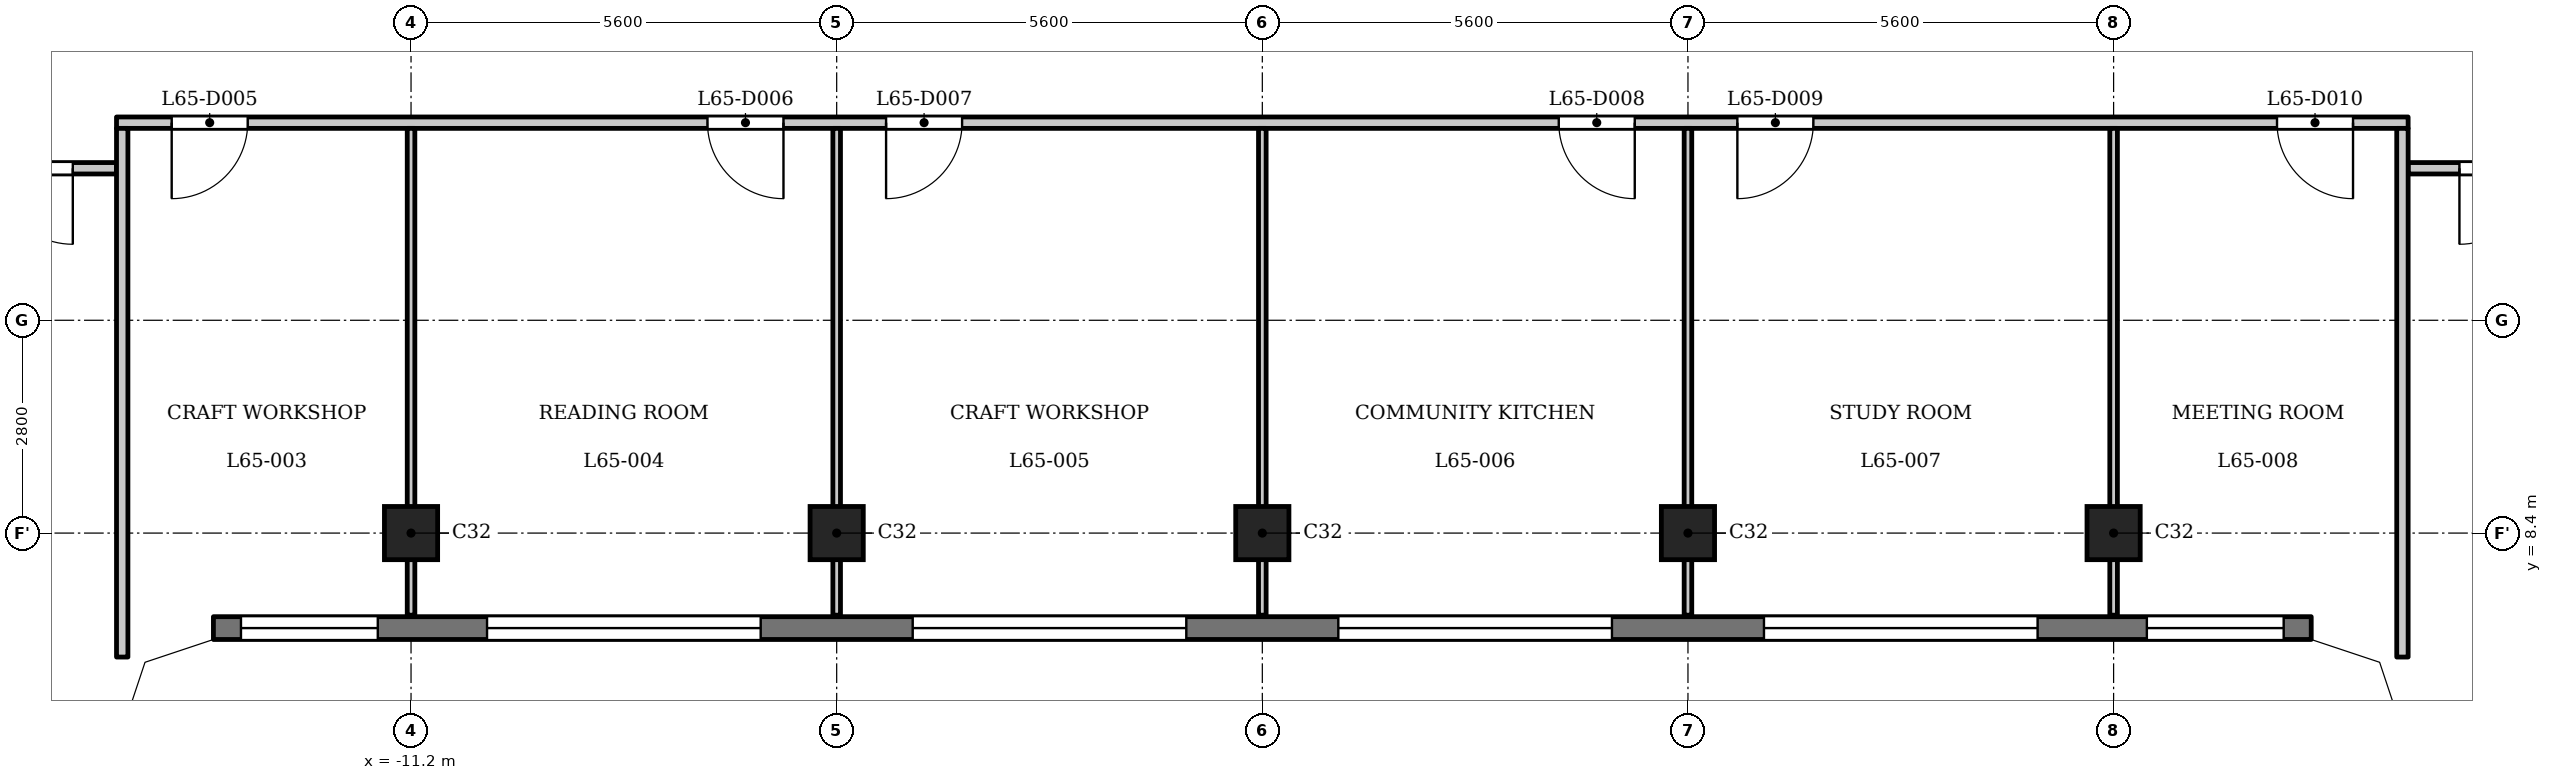
"""IFC4 building model, lengths in metres.
Left out: names, types, materials, properties, quantities, classifications, styles, units other than length and angle.
Written with IfcOpenShell. Run it as: python <this file> out.ifc"""

import sys

from ifc_helpers import new_model, si_unit, direction, frame, frame_2d, origin, origin_2d, place, context, subcontext, project, spatial, polyline, rectangle, outline, extrude, element, fill, save


model = new_model("IFC4")
c1 = context("Model", 3, precision=1e-05, world=origin(), true_north=direction((0.0, 1.0)))
c2 = subcontext(c1, "Body", "Model", "MODEL_VIEW")
j1 = project(units=[si_unit("LENGTHUNIT", "METRE"), si_unit("PLANEANGLEUNIT", "RADIAN")], contexts=[c1])
p1 = place(None, origin())
s1 = spatial("IfcSite", under=j1, at=p1, CompositionType="ELEMENT")
p2 = place(p1, origin())
s2 = spatial("IfcBuilding", under=s1, at=p2, CompositionType="ELEMENT")
p3 = place(p2, frame((0.0, 0.0, 252.2)))
s3 = spatial("IfcBuildingStorey", under=s2, at=p3, CompositionType="ELEMENT", Elevation=252.2)
for number, where, z_axis, x_axis in (
    (1, (-11.2, 8.4, 0.0), (0.0, 0.0, 1.0), (1.0, 0.0, 0.0)),
    (2, (-5.6, 8.4, 0.0), (0.0, 0.0, 1.0), (1.0, 0.0, 0.0)),
    (3, (0.0, 8.4, 0.0), (0.0, 0.0, 1.0), (1.0, 0.0, 0.0)),
    (4, (5.6, 8.4, 0.0), (0.0, 0.0, 1.0), (1.0, 0.0, 0.0)),
    (5, (11.2, 8.4, 0.0), (0.0, 0.0, 1.0), (1.0, 0.0, 0.0)),
):
    element("IfcColumn", number, at=place(p3, frame(where, z_axis=z_axis, x_axis=x_axis)), inside=s3, PredefinedType="COLUMN", context=c2, shape_type="SweptSolid", body=[
        extrude(rectangle(XDim=0.7, YDim=0.7, at=origin_2d()), origin(), (0.0, 0.0, 1.0), 3.5),
    ])
p4 = place(p3, frame((-13.8, 7.15, 0.0), z_axis=(0.0, 0.0, 1.0), x_axis=(1.0, 0.0, 0.0)))
e6 = element("IfcWall", 6, at=p4, inside=s3, PredefinedType="SOLIDWALL", context=c2, shape_type="SweptSolid", body=[
    extrude(rectangle(XDim=27.6, YDim=0.3, at=frame_2d((13.8, 0.0))), origin(), (0.0, 0.0, 1.0), 3.2),
])
p5 = place(p4, frame((0.363, 0.0, 0.9)))
e7 = element("IfcOpeningElement", 7, at=p5, cuts=e6, PredefinedType="OPENING", context=c2, shape_type="SweptSolid", body=[
    extrude(rectangle(XDim=1.8, YDim=1.25, at=frame_2d((0.9, 0.625))), frame((0.0, 0.16, 0.0), z_axis=(0.0, -1.0, 0.0), x_axis=(1.0, 0.0, 0.0)), (0.0, 0.0, 1.0), 0.32),
])
p6 = place(p4, frame((3.6, 0.0, 1.2)))
e8 = element("IfcOpeningElement", 8, at=p6, cuts=e6, PredefinedType="OPENING", context=c2, shape_type="SweptSolid", body=[
    extrude(rectangle(XDim=3.6, YDim=0.95, at=frame_2d((1.8, 0.475))), frame((0.0, 0.16, 0.0), z_axis=(0.0, -1.0, 0.0), x_axis=(1.0, 0.0, 0.0)), (0.0, 0.0, 1.0), 0.32),
])
p7 = place(p4, frame((9.2, 0.0, 1.2)))
e9 = element("IfcOpeningElement", 9, at=p7, cuts=e6, PredefinedType="OPENING", context=c2, shape_type="SweptSolid", body=[
    extrude(rectangle(XDim=3.6, YDim=0.95, at=frame_2d((1.8, 0.475))), frame((0.0, 0.16, 0.0), z_axis=(0.0, -1.0, 0.0), x_axis=(1.0, 0.0, 0.0)), (0.0, 0.0, 1.0), 0.32),
])
p8 = place(p4, frame((14.8, 0.0, 1.2)))
e10 = element("IfcOpeningElement", 10, at=p8, cuts=e6, PredefinedType="OPENING", context=c2, shape_type="SweptSolid", body=[
    extrude(rectangle(XDim=3.6, YDim=0.95, at=frame_2d((1.8, 0.475))), frame((0.0, 0.16, 0.0), z_axis=(0.0, -1.0, 0.0), x_axis=(1.0, 0.0, 0.0)), (0.0, 0.0, 1.0), 0.32),
])
p9 = place(p4, frame((20.4, 0.0, 1.2)))
e11 = element("IfcOpeningElement", 11, at=p9, cuts=e6, PredefinedType="OPENING", context=c2, shape_type="SweptSolid", body=[
    extrude(rectangle(XDim=3.6, YDim=0.95, at=frame_2d((1.8, 0.475))), frame((0.0, 0.16, 0.0), z_axis=(0.0, -1.0, 0.0), x_axis=(1.0, 0.0, 0.0)), (0.0, 0.0, 1.0), 0.32),
])
p10 = place(p4, frame((25.438, 0.0, 0.9)))
e12 = element("IfcOpeningElement", 12, at=p10, cuts=e6, PredefinedType="OPENING", context=c2, shape_type="SweptSolid", body=[
    extrude(rectangle(XDim=1.8, YDim=1.25, at=frame_2d((0.9, 0.625))), frame((0.0, 0.16, 0.0), z_axis=(0.0, -1.0, 0.0), x_axis=(1.0, 0.0, 0.0)), (0.0, 0.0, 1.0), 0.32),
])
p11 = place(p3, frame((-17.4, 13.2, 0.0), z_axis=(0.0, 0.0, 1.0), x_axis=(1.0, 0.0, 0.0)))
e13 = element("IfcWall", 13, at=p11, inside=s3, PredefinedType="PARTITIONING", context=c2, shape_type="SweptSolid", body=[
    extrude(rectangle(XDim=2.325, YDim=0.15, at=frame_2d((1.163, 0.0))), origin(), (0.0, 0.0, 1.0), 3.2),
])
p12 = place(p11, frame((0.75, 0.0, 0.0)))
e14 = element("IfcOpeningElement", 14, at=p12, cuts=e13, PredefinedType="OPENING", context=c2, shape_type="SweptSolid", body=[
    extrude(rectangle(XDim=1.0, YDim=2.1, at=frame_2d((0.5, 1.05))), frame((0.0, 0.085, 0.0), z_axis=(0.0, -1.0, 0.0), x_axis=(1.0, 0.0, 0.0)), (0.0, 0.0, 1.0), 0.17),
])
p13 = place(p3, frame((15.075, 13.2, 0.0), z_axis=(0.0, 0.0, 1.0), x_axis=(1.0, 0.0, 0.0)))
e15 = element("IfcWall", 15, at=p13, inside=s3, PredefinedType="PARTITIONING", context=c2, shape_type="SweptSolid", body=[
    extrude(rectangle(XDim=2.325, YDim=0.15, at=frame_2d((1.163, 0.0))), origin(), (0.0, 0.0, 1.0), 3.2),
])
p14 = place(p13, frame((0.675, 0.0, 0.0)))
e16 = element("IfcOpeningElement", 16, at=p14, cuts=e15, PredefinedType="OPENING", context=c2, shape_type="SweptSolid", body=[
    extrude(rectangle(XDim=1.0, YDim=2.1, at=frame_2d((0.5, 1.05))), frame((0.0, 0.085, 0.0), z_axis=(0.0, -1.0, 0.0), x_axis=(1.0, 0.0, 0.0)), (0.0, 0.0, 1.0), 0.17),
])
p15 = place(p3, frame((-15.075, 13.8, 0.0), z_axis=(0.0, 0.0, 1.0), x_axis=(1.0, 0.0, 0.0)))
e17 = element("IfcWall", 17, at=p15, inside=s3, PredefinedType="PARTITIONING", context=c2, shape_type="SweptSolid", body=[
    extrude(rectangle(XDim=30.15, YDim=0.15, at=frame_2d((15.075, 0.0))), origin(), (0.0, 0.0, 1.0), 3.2),
])
p16 = place(p15, frame((0.726, 0.0, 0.0)))
e18 = element("IfcOpeningElement", 18, at=p16, cuts=e17, PredefinedType="OPENING", context=c2, shape_type="SweptSolid", body=[
    extrude(rectangle(XDim=1.0, YDim=2.1, at=frame_2d((0.5, 1.05))), frame((0.0, 0.085, 0.0), z_axis=(0.0, -1.0, 0.0), x_axis=(1.0, 0.0, 0.0)), (0.0, 0.0, 1.0), 0.17),
])
p17 = place(p15, frame((7.775, 0.0, 0.0)))
e19 = element("IfcOpeningElement", 19, at=p17, cuts=e17, PredefinedType="OPENING", context=c2, shape_type="SweptSolid", body=[
    extrude(rectangle(XDim=1.0, YDim=2.1, at=frame_2d((0.5, 1.05))), frame((0.0, 0.085, 0.0), z_axis=(0.0, -1.0, 0.0), x_axis=(1.0, 0.0, 0.0)), (0.0, 0.0, 1.0), 0.17),
])
p18 = place(p15, frame((10.125, 0.0, 0.0)))
e20 = element("IfcOpeningElement", 20, at=p18, cuts=e17, PredefinedType="OPENING", context=c2, shape_type="SweptSolid", body=[
    extrude(rectangle(XDim=1.0, YDim=2.1, at=frame_2d((0.5, 1.05))), frame((0.0, 0.085, 0.0), z_axis=(0.0, -1.0, 0.0), x_axis=(1.0, 0.0, 0.0)), (0.0, 0.0, 1.0), 0.17),
])
p19 = place(p15, frame((18.975, 0.0, 0.0)))
e21 = element("IfcOpeningElement", 21, at=p19, cuts=e17, PredefinedType="OPENING", context=c2, shape_type="SweptSolid", body=[
    extrude(rectangle(XDim=1.0, YDim=2.1, at=frame_2d((0.5, 1.05))), frame((0.0, 0.085, 0.0), z_axis=(0.0, -1.0, 0.0), x_axis=(1.0, 0.0, 0.0)), (0.0, 0.0, 1.0), 0.17),
])
p20 = place(p15, frame((21.325, 0.0, 0.0)))
e22 = element("IfcOpeningElement", 22, at=p20, cuts=e17, PredefinedType="OPENING", context=c2, shape_type="SweptSolid", body=[
    extrude(rectangle(XDim=1.0, YDim=2.1, at=frame_2d((0.5, 1.05))), frame((0.0, 0.085, 0.0), z_axis=(0.0, -1.0, 0.0), x_axis=(1.0, 0.0, 0.0)), (0.0, 0.0, 1.0), 0.17),
])
p21 = place(p15, frame((28.425, 0.0, 0.0)))
e23 = element("IfcOpeningElement", 23, at=p21, cuts=e17, PredefinedType="OPENING", context=c2, shape_type="SweptSolid", body=[
    extrude(rectangle(XDim=1.0, YDim=2.1, at=frame_2d((0.5, 1.05))), frame((0.0, 0.085, 0.0), z_axis=(0.0, -1.0, 0.0), x_axis=(1.0, 0.0, 0.0)), (0.0, 0.0, 1.0), 0.17),
])
p22 = place(p3, frame((-15.0, 6.769, 0.0), z_axis=(0.0, 0.0, 1.0), x_axis=(0.0, 1.0, 0.0)))
e24 = element("IfcWall", 24, at=p22, inside=s3, PredefinedType="PARTITIONING", context=c2, shape_type="SweptSolid", body=[
    extrude(rectangle(XDim=6.956, YDim=0.15, at=frame_2d((3.478, 0.0))), origin(), (0.0, 0.0, 1.0), 3.2),
])
for number, where, z_axis, x_axis in (
    (25, (-11.2, 7.32, 0.0), (0.0, 0.0, 1.0), (0.0, 1.0, 0.0)),
    (26, (-5.6, 7.32, 0.0), (0.0, 0.0, 1.0), (0.0, 1.0, 0.0)),
    (27, (0.0, 7.32, 0.0), (0.0, 0.0, 1.0), (0.0, 1.0, 0.0)),
    (28, (5.6, 7.32, 0.0), (0.0, 0.0, 1.0), (0.0, 1.0, 0.0)),
    (29, (11.2, 7.32, 0.0), (0.0, 0.0, 1.0), (0.0, 1.0, 0.0)),
):
    element("IfcWall", number, at=place(p3, frame(where, z_axis=z_axis, x_axis=x_axis)), inside=s3, PredefinedType="PARTITIONING", context=c2, shape_type="SweptSolid", body=[
        extrude(rectangle(XDim=6.405, YDim=0.1, at=frame_2d((3.203, 0.0))), origin(), (0.0, 0.0, 1.0), 3.2),
    ])
p23 = place(p3, frame((15.0, 6.769, 0.0), z_axis=(0.0, 0.0, 1.0), x_axis=(0.0, 1.0, 0.0)))
e30 = element("IfcWall", 30, at=p23, inside=s3, PredefinedType="PARTITIONING", context=c2, shape_type="SweptSolid", body=[
    extrude(rectangle(XDim=6.956, YDim=0.15, at=frame_2d((3.478, 0.0))), origin(), (0.0, 0.0, 1.0), 3.2),
])
p24 = place(p3, origin())
e31 = element("IfcWall", 31, at=p24, inside=s3, PredefinedType="SOLIDWALL", context=c2, shape_type="SweptSolid", body=[
    extrude(outline(polyline([(-13.849, 7.3), (-14.937, 6.937), (-15.3, 5.849), (-15.3, 5.8), (-15.0, 5.8), (-14.7, 6.7), (-13.8, 7.0), (-13.8, 7.3), (-13.849, 7.3)])), origin(), (0.0, 0.0, 1.0), 3.2),
])
e32 = element("IfcWall", 32, at=p24, inside=s3, PredefinedType="SOLIDWALL", context=c2, shape_type="SweptSolid", body=[
    extrude(outline(polyline([(14.937, 6.937), (13.849, 7.3), (13.8, 7.3), (13.8, 7.0), (14.7, 6.7), (15.0, 5.8), (15.3, 5.8), (15.3, 5.849), (14.937, 6.937)])), origin(), (0.0, 0.0, 1.0), 3.2),
])
p25 = place(p12, origin())
e33 = element("IfcDoor", 33, at=p25, inside=s3, OperationType="SINGLE_SWING_RIGHT", PredefinedType="DOOR", context=c2, shape_type="SweptSolid", body=[
    extrude(rectangle(XDim=1.0, YDim=2.1, at=frame_2d((0.5, 1.05))), frame((0.0, 0.025, 0.0), z_axis=(0.0, -1.0, 0.0), x_axis=(1.0, 0.0, 0.0)), (0.0, 0.0, 1.0), 0.05),
])
fill(e14, e33)
p26 = place(p14, origin())
e34 = element("IfcDoor", 34, at=p26, inside=s3, OperationType="SINGLE_SWING_LEFT", PredefinedType="DOOR", context=c2, shape_type="SweptSolid", body=[
    extrude(rectangle(XDim=1.0, YDim=2.1, at=frame_2d((0.5, 1.05))), frame((0.0, 0.025, 0.0), z_axis=(0.0, -1.0, 0.0), x_axis=(1.0, 0.0, 0.0)), (0.0, 0.0, 1.0), 0.05),
])
fill(e16, e34)
p27 = place(p16, origin())
e35 = element("IfcDoor", 35, at=p27, inside=s3, OperationType="SINGLE_SWING_LEFT", PredefinedType="DOOR", context=c2, shape_type="SweptSolid", body=[
    extrude(rectangle(XDim=1.0, YDim=2.1, at=frame_2d((0.5, 1.05))), frame((0.0, 0.025, 0.0), z_axis=(0.0, -1.0, 0.0), x_axis=(1.0, 0.0, 0.0)), (0.0, 0.0, 1.0), 0.05),
])
fill(e18, e35)
p28 = place(p17, origin())
e36 = element("IfcDoor", 36, at=p28, inside=s3, OperationType="SINGLE_SWING_RIGHT", PredefinedType="DOOR", context=c2, shape_type="SweptSolid", body=[
    extrude(rectangle(XDim=1.0, YDim=2.1, at=frame_2d((0.5, 1.05))), frame((0.0, 0.025, 0.0), z_axis=(0.0, -1.0, 0.0), x_axis=(1.0, 0.0, 0.0)), (0.0, 0.0, 1.0), 0.05),
])
fill(e19, e36)
p29 = place(p18, origin())
e37 = element("IfcDoor", 37, at=p29, inside=s3, OperationType="SINGLE_SWING_LEFT", PredefinedType="DOOR", context=c2, shape_type="SweptSolid", body=[
    extrude(rectangle(XDim=1.0, YDim=2.1, at=frame_2d((0.5, 1.05))), frame((0.0, 0.025, 0.0), z_axis=(0.0, -1.0, 0.0), x_axis=(1.0, 0.0, 0.0)), (0.0, 0.0, 1.0), 0.05),
])
fill(e20, e37)
p30 = place(p19, origin())
e38 = element("IfcDoor", 38, at=p30, inside=s3, OperationType="SINGLE_SWING_RIGHT", PredefinedType="DOOR", context=c2, shape_type="SweptSolid", body=[
    extrude(rectangle(XDim=1.0, YDim=2.1, at=frame_2d((0.5, 1.05))), frame((0.0, 0.025, 0.0), z_axis=(0.0, -1.0, 0.0), x_axis=(1.0, 0.0, 0.0)), (0.0, 0.0, 1.0), 0.05),
])
fill(e21, e38)
p31 = place(p20, origin())
e39 = element("IfcDoor", 39, at=p31, inside=s3, OperationType="SINGLE_SWING_LEFT", PredefinedType="DOOR", context=c2, shape_type="SweptSolid", body=[
    extrude(rectangle(XDim=1.0, YDim=2.1, at=frame_2d((0.5, 1.05))), frame((0.0, 0.025, 0.0), z_axis=(0.0, -1.0, 0.0), x_axis=(1.0, 0.0, 0.0)), (0.0, 0.0, 1.0), 0.05),
])
fill(e22, e39)
p32 = place(p21, origin())
e40 = element("IfcDoor", 40, at=p32, inside=s3, OperationType="SINGLE_SWING_RIGHT", PredefinedType="DOOR", context=c2, shape_type="SweptSolid", body=[
    extrude(rectangle(XDim=1.0, YDim=2.1, at=frame_2d((0.5, 1.05))), frame((0.0, 0.025, 0.0), z_axis=(0.0, -1.0, 0.0), x_axis=(1.0, 0.0, 0.0)), (0.0, 0.0, 1.0), 0.05),
])
fill(e23, e40)
p33 = place(p5, origin())
e41 = element("IfcWindow", 41, at=p33, inside=s3, PartitioningType="SINGLE_PANEL", PredefinedType="WINDOW", context=c2, shape_type="SweptSolid", body=[
    extrude(rectangle(XDim=1.8, YDim=1.25, at=frame_2d((0.9, 0.625))), frame((0.0, 0.03, 0.0), z_axis=(0.0, -1.0, 0.0), x_axis=(1.0, 0.0, 0.0)), (0.0, 0.0, 1.0), 0.06),
])
fill(e7, e41)
p34 = place(p6, origin())
e42 = element("IfcWindow", 42, at=p34, inside=s3, PartitioningType="SINGLE_PANEL", PredefinedType="WINDOW", context=c2, shape_type="SweptSolid", body=[
    extrude(rectangle(XDim=3.6, YDim=0.95, at=frame_2d((1.8, 0.475))), frame((0.0, 0.03, 0.0), z_axis=(0.0, -1.0, 0.0), x_axis=(1.0, 0.0, 0.0)), (0.0, 0.0, 1.0), 0.06),
])
fill(e8, e42)
p35 = place(p7, origin())
e43 = element("IfcWindow", 43, at=p35, inside=s3, PartitioningType="SINGLE_PANEL", PredefinedType="WINDOW", context=c2, shape_type="SweptSolid", body=[
    extrude(rectangle(XDim=3.6, YDim=0.95, at=frame_2d((1.8, 0.475))), frame((0.0, 0.03, 0.0), z_axis=(0.0, -1.0, 0.0), x_axis=(1.0, 0.0, 0.0)), (0.0, 0.0, 1.0), 0.06),
])
fill(e9, e43)
p36 = place(p8, origin())
e44 = element("IfcWindow", 44, at=p36, inside=s3, PartitioningType="SINGLE_PANEL", PredefinedType="WINDOW", context=c2, shape_type="SweptSolid", body=[
    extrude(rectangle(XDim=3.6, YDim=0.95, at=frame_2d((1.8, 0.475))), frame((0.0, 0.03, 0.0), z_axis=(0.0, -1.0, 0.0), x_axis=(1.0, 0.0, 0.0)), (0.0, 0.0, 1.0), 0.06),
])
fill(e10, e44)
p37 = place(p9, origin())
e45 = element("IfcWindow", 45, at=p37, inside=s3, PartitioningType="SINGLE_PANEL", PredefinedType="WINDOW", context=c2, shape_type="SweptSolid", body=[
    extrude(rectangle(XDim=3.6, YDim=0.95, at=frame_2d((1.8, 0.475))), frame((0.0, 0.03, 0.0), z_axis=(0.0, -1.0, 0.0), x_axis=(1.0, 0.0, 0.0)), (0.0, 0.0, 1.0), 0.06),
])
fill(e11, e45)
p38 = place(p10, origin())
e46 = element("IfcWindow", 46, at=p38, inside=s3, PartitioningType="SINGLE_PANEL", PredefinedType="WINDOW", context=c2, shape_type="SweptSolid", body=[
    extrude(rectangle(XDim=1.8, YDim=1.25, at=frame_2d((0.9, 0.625))), frame((0.0, 0.03, 0.0), z_axis=(0.0, -1.0, 0.0), x_axis=(1.0, 0.0, 0.0)), (0.0, 0.0, 1.0), 0.06),
])
fill(e12, e46)
save(model, sys.argv[1])
